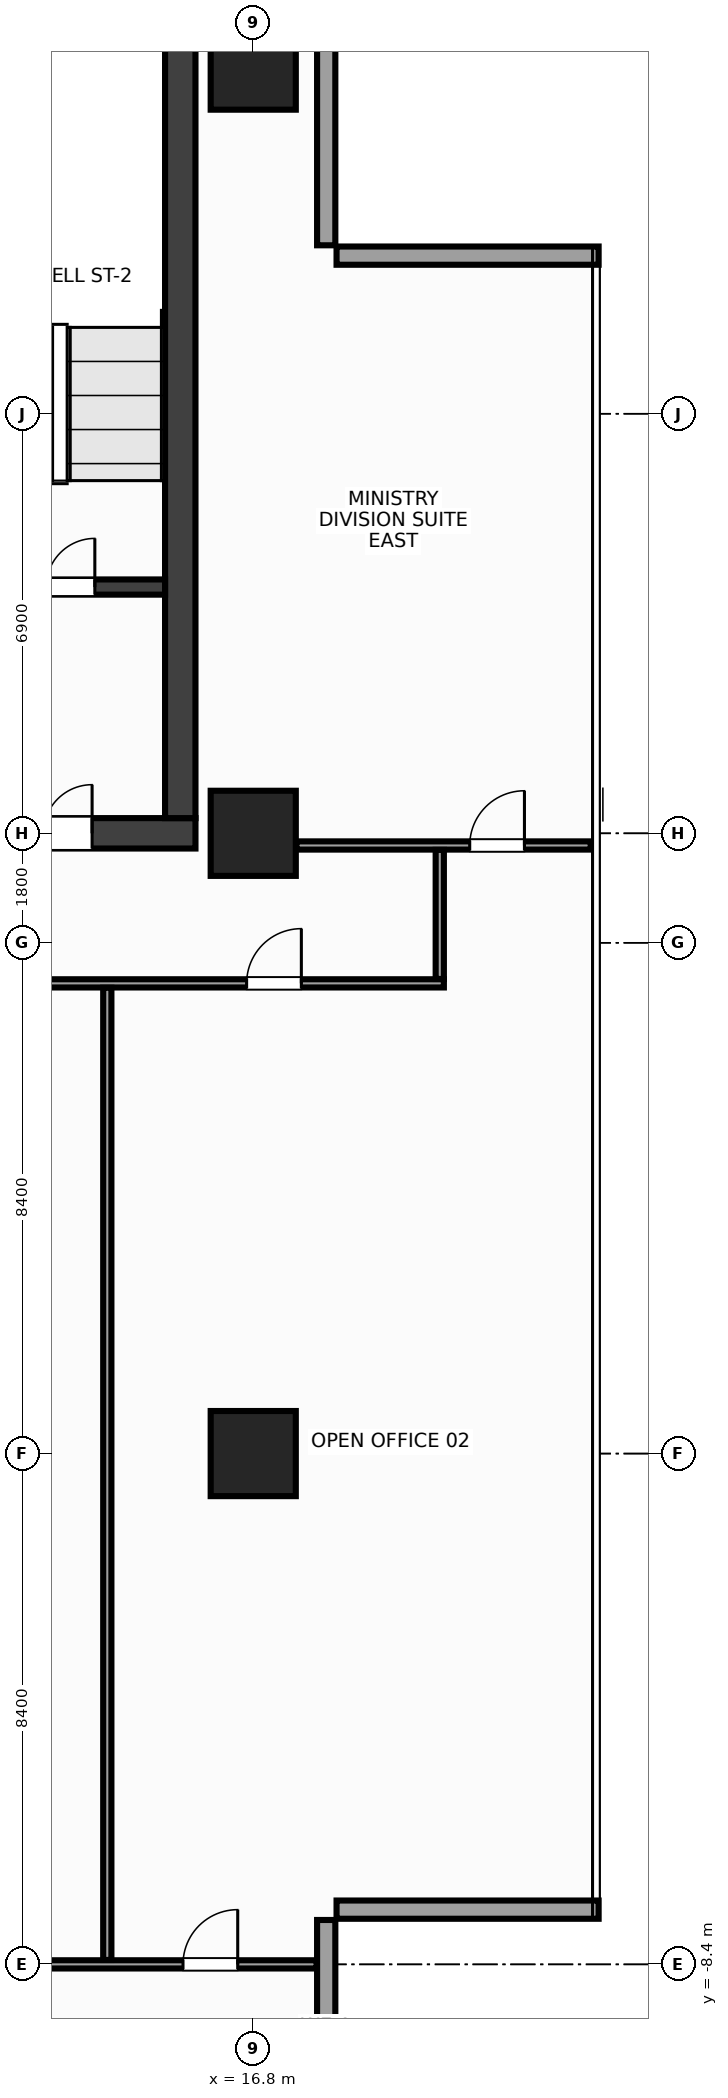
"""IFC4 building model, lengths in metres.
Left out: names, types, materials, properties, quantities, classifications, styles, units other than length and angle.
Written with IfcOpenShell. Run it as: python <this file> out.ifc"""

import sys

from ifc_helpers import new_model, si_unit, direction, frame, frame_2d, origin, origin_2d, place, context, subcontext, project, spatial, rectangle, extrude, source, transform, mapped, element, fill, save


model = new_model("IFC4")
c1 = context("Model", 3, precision=1e-05, world=origin(), true_north=direction((0.0, 1.0)))
c2 = subcontext(c1, "Body", "Model", "MODEL_VIEW")
j1 = project(units=[si_unit("LENGTHUNIT", "METRE"), si_unit("PLANEANGLEUNIT", "RADIAN")], contexts=[c1])
p1 = place(None, origin())
s1 = spatial("IfcSite", under=j1, at=p1, CompositionType="ELEMENT")
p2 = place(p1, origin())
s2 = spatial("IfcBuilding", under=s1, at=p2, CompositionType="ELEMENT")
p3 = place(p2, frame((0.0, 0.0, 239.6)))
s3 = spatial("IfcBuildingStorey", under=s2, at=p3, CompositionType="ELEMENT", Elevation=239.6)
m1 = source(origin(), c2, "Body", "SweptSolid", [
    extrude(rectangle(XDim=31.7, YDim=0.5, at=frame_2d((15.85, 0.0))), origin(), (0.0, 0.0, 1.0), 3.6),
])
p4 = place(p3, frame((-15.85, 10.2, 0.0), z_axis=(0.0, 0.0, 1.0), x_axis=(1.0, 0.0, 0.0)))
e1 = element("IfcWall", 1, at=p4, inside=s3, PredefinedType="SHEAR", context=c2, shape_type="MappedRepresentation", body=[
    mapped(m1, transform((0.0, 0.0, 0.0), x_axis=(1.0, 0.0, 0.0), y_axis=(0.0, 1.0, 0.0), z_axis=(0.0, 0.0, 1.0), scale=1.0)),
])
p5 = place(p4, frame((1.7, 0.0, 0.0)))
e2 = element("IfcOpeningElement", 2, at=p5, cuts=e1, PredefinedType="OPENING", context=c2, shape_type="SweptSolid", body=[
    extrude(rectangle(XDim=1.6, YDim=2.15, at=frame_2d((0.8, 1.075))), frame((0.0, 0.262, 0.0), z_axis=(0.0, -1.0, 0.0), x_axis=(1.0, 0.0, 0.0)), (0.0, 0.0, 1.0), 0.524),
])
p6 = place(p4, frame((28.4, 0.0, 0.0)))
e3 = element("IfcOpeningElement", 3, at=p6, cuts=e1, PredefinedType="OPENING", context=c2, shape_type="SweptSolid", body=[
    extrude(rectangle(XDim=1.6, YDim=2.15, at=frame_2d((0.8, 1.075))), frame((0.0, 0.262, 0.0), z_axis=(0.0, -1.0, 0.0), x_axis=(1.0, 0.0, 0.0)), (0.0, 0.0, 1.0), 0.524),
])
p7 = place(p4, frame((15.1, 0.0, 0.0)))
e4 = element("IfcOpeningElement", 4, at=p7, cuts=e1, PredefinedType="OPENING", context=c2, shape_type="SweptSolid", body=[
    extrude(rectangle(XDim=1.5, YDim=2.2, at=frame_2d((0.75, 1.1))), frame((0.0, 0.262, 0.0), z_axis=(0.0, -1.0, 0.0), x_axis=(1.0, 0.0, 0.0)), (0.0, 0.0, 1.0), 0.524),
])
m2 = source(origin(), c2, "Body", "SweptSolid", [
    extrude(rectangle(XDim=13.1, YDim=0.5, at=frame_2d((6.55, 0.0))), origin(), (0.0, 0.0, 1.0), 3.6),
])
p8 = place(p3, frame((15.6, 10.45, 0.0), z_axis=(0.0, 0.0, 1.0), x_axis=(0.0, 1.0, 0.0)))
e5 = element("IfcWall", 5, at=p8, inside=s3, PredefinedType="SHEAR", context=c2, shape_type="MappedRepresentation", body=[
    mapped(m2, transform((0.0, 0.0, 0.0), x_axis=(1.0, 0.0, 0.0), y_axis=(0.0, 1.0, 0.0), z_axis=(0.0, 0.0, 1.0), scale=1.0)),
])
m3 = source(origin(), c2, "Body", "SweptSolid", [
    extrude(rectangle(XDim=3.705, YDim=0.25, at=frame_2d((1.853, 0.0))), origin(), (0.0, 0.0, 1.0), 3.6),
])
p9 = place(p3, frame((11.645, 14.25, 0.0), z_axis=(0.0, 0.0, 1.0), x_axis=(1.0, 0.0, 0.0)))
e6 = element("IfcWall", 6, at=p9, inside=s3, PredefinedType="SHEAR", context=c2, shape_type="MappedRepresentation", body=[
    mapped(m3, transform((0.0, 0.0, 0.0), x_axis=(1.0, 0.0, 0.0), y_axis=(0.0, 1.0, 0.0), z_axis=(0.0, 0.0, 1.0), scale=1.0)),
])
p10 = place(p9, frame((0.95, 0.0, 0.0)))
e7 = element("IfcOpeningElement", 7, at=p10, cuts=e6, PredefinedType="OPENING", context=c2, shape_type="SweptSolid", body=[
    extrude(rectangle(XDim=1.6, YDim=2.15, at=frame_2d((0.8, 1.075))), frame((0.0, 0.137, 0.0), z_axis=(0.0, -1.0, 0.0), x_axis=(1.0, 0.0, 0.0)), (0.0, 0.0, 1.0), 0.274),
])
m4 = source(origin(), c2, "Body", "SweptSolid", [
    extrude(rectangle(XDim=1.4, YDim=1.4, at=origin_2d()), origin(), (0.0, 0.0, 1.0), 3.6),
])
for number, where, z_axis, x_axis in (
    (8, (16.8, 0.0, 0.0), (0.0, 0.0, 1.0), (1.0, 0.0, 0.0)),
    (9, (16.8, 10.2, 0.0), (0.0, 0.0, 1.0), (1.0, 0.0, 0.0)),
    (10, (16.8, 22.8, 0.0), (0.0, 0.0, 1.0), (1.0, 0.0, 0.0)),
):
    element("IfcColumn", number, at=place(p3, frame(where, z_axis=z_axis, x_axis=x_axis)), inside=s3, PredefinedType="COLUMN", context=c2, shape_type="MappedRepresentation", body=[
        mapped(m4, transform((0.0, 0.0, 0.0), x_axis=(1.0, 0.0, 0.0), y_axis=(0.0, 1.0, 0.0), z_axis=(0.0, 0.0, 1.0), scale=1.0)),
    ])
m5 = source(origin(), c2, "Body", "SweptSolid", [
    extrude(rectangle(XDim=4.31, YDim=0.3, at=frame_2d((2.155, 0.0))), origin(), (0.0, 0.0, 1.0), 2.75),
])
for number, where, z_axis, x_axis in (
    (11, (18.0, -11.98, 0.0), (0.0, 0.0, 1.0), (0.0, 1.0, 0.0)),
    (12, (18.17, -7.5, 0.0), (0.0, 0.0, 1.0), (1.0, 0.0, 0.0)),
    (13, (22.48, 19.7, 0.0), (0.0, 0.0, 1.0), (-1.0, 0.0, 0.0)),
):
    element("IfcWall", number, at=place(p3, frame(where, z_axis=z_axis, x_axis=x_axis)), inside=s3, PredefinedType="STANDARD", context=c2, shape_type="MappedRepresentation", body=[
        mapped(m5, transform((0.0, 0.0, 0.0), x_axis=(1.0, 0.0, 0.0), y_axis=(0.0, 1.0, 0.0), z_axis=(0.0, 0.0, 1.0), scale=1.0)),
    ])
m6 = source(origin(), c2, "Body", "SweptSolid", [
    extrude(rectangle(XDim=4.31, YDim=0.3, at=frame_2d((2.155, 0.0))), origin(), (0.0, 0.0, 1.0), 2.75),
])
p11 = place(p3, frame((18.0, 19.87, 0.0), z_axis=(0.0, 0.0, 1.0), x_axis=(0.0, 1.0, 0.0)))
e14 = element("IfcWall", 14, at=p11, inside=s3, PredefinedType="STANDARD", context=c2, shape_type="MappedRepresentation", body=[
    mapped(m6, transform((0.0, 0.0, 0.0), x_axis=(1.0, 0.0, 0.0), y_axis=(0.0, 1.0, 0.0), z_axis=(0.0, 0.0, 1.0), scale=1.0)),
])
m7 = source(origin(), c2, "Body", "SweptSolid", [
    extrude(rectangle(XDim=4.84, YDim=0.135, at=frame_2d((2.42, 0.0))), origin(), (0.0, 0.0, 1.0), 3.37),
])
p12 = place(p3, frame((17.51, 10.0, 0.0), z_axis=(0.0, 0.0, 1.0), x_axis=(1.0, 0.0, 0.0)))
e15 = element("IfcWall", 15, at=p12, inside=s3, PredefinedType="PARTITIONING", context=c2, shape_type="MappedRepresentation", body=[
    mapped(m7, transform((0.0, 0.0, 0.0), x_axis=(1.0, 0.0, 0.0), y_axis=(0.0, 1.0, 0.0), z_axis=(0.0, 0.0, 1.0), scale=1.0)),
])
p13 = place(p12, frame((2.85, 0.0, 0.0)))
e16 = element("IfcOpeningElement", 16, at=p13, cuts=e15, PredefinedType="OPENING", context=c2, shape_type="SweptSolid", body=[
    extrude(rectangle(XDim=0.9, YDim=2.15, at=frame_2d((0.45, 1.075))), frame((0.0, 0.08, 0.0), z_axis=(0.0, -1.0, 0.0), x_axis=(1.0, 0.0, 0.0)), (0.0, 0.0, 1.0), 0.159),
])
m8 = source(origin(), c2, "Body", "SweptSolid", [
    extrude(rectangle(XDim=21.9, YDim=0.135, at=frame_2d((10.95, 0.0))), origin(), (0.0, 0.0, 1.0), 2.755),
])
p14 = place(p3, frame((-1.965, 7.732, 0.0), z_axis=(0.0, 0.0, 1.0), x_axis=(1.0, 0.0, 0.0)))
e17 = element("IfcWall", 17, at=p14, inside=s3, PredefinedType="PARTITIONING", context=c2, shape_type="MappedRepresentation", body=[
    mapped(m8, transform((0.0, 0.0, 0.0), x_axis=(1.0, 0.0, 0.0), y_axis=(0.0, 1.0, 0.0), z_axis=(0.0, 0.0, 1.0), scale=1.0)),
])
p15 = place(p14, frame((18.656, 0.0, 0.0)))
e18 = element("IfcOpeningElement", 18, at=p15, cuts=e17, PredefinedType="OPENING", context=c2, shape_type="SweptSolid", body=[
    extrude(rectangle(XDim=0.9, YDim=2.15, at=frame_2d((0.45, 1.075))), frame((0.0, 0.08, 0.0), z_axis=(0.0, -1.0, 0.0), x_axis=(1.0, 0.0, 0.0)), (0.0, 0.0, 1.0), 0.159),
])
p16 = place(p14, frame((8.115, 0.0, 0.0)))
e19 = element("IfcOpeningElement", 19, at=p16, cuts=e17, PredefinedType="OPENING", context=c2, shape_type="SweptSolid", body=[
    extrude(rectangle(XDim=0.9, YDim=2.15, at=frame_2d((0.45, 1.075))), frame((0.0, 0.08, 0.0), z_axis=(0.0, -1.0, 0.0), x_axis=(1.0, 0.0, 0.0)), (0.0, 0.0, 1.0), 0.159),
])
m9 = source(origin(), c2, "Body", "SweptSolid", [
    extrude(rectangle(XDim=2.123, YDim=0.135, at=frame_2d((1.061, 0.0))), origin(), (0.0, 0.0, 1.0), 3.37),
])
p17 = place(p3, frame((19.867, 7.805, 0.0), z_axis=(0.0, 0.0, 1.0), x_axis=(0.0, 1.0, 0.0)))
e20 = element("IfcWall", 20, at=p17, inside=s3, PredefinedType="PARTITIONING", context=c2, shape_type="MappedRepresentation", body=[
    mapped(m9, transform((0.0, 0.0, 0.0), x_axis=(1.0, 0.0, 0.0), y_axis=(0.0, 1.0, 0.0), z_axis=(0.0, 0.0, 1.0), scale=1.0)),
])
m10 = source(origin(), c2, "Body", "SweptSolid", [
    extrude(rectangle(XDim=35.684, YDim=0.135, at=frame_2d((17.842, 0.0))), origin(), (0.0, 0.0, 1.0), 2.755),
])
p18 = place(p3, frame((-17.842, -8.4, 0.0), z_axis=(0.0, 0.0, 1.0), x_axis=(1.0, 0.0, 0.0)))
e21 = element("IfcWall", 21, at=p18, inside=s3, PredefinedType="PARTITIONING", context=c2, shape_type="MappedRepresentation", body=[
    mapped(m10, transform((0.0, 0.0, 0.0), x_axis=(1.0, 0.0, 0.0), y_axis=(0.0, 1.0, 0.0), z_axis=(0.0, 0.0, 1.0), scale=1.0)),
])
p19 = place(p18, frame((8.892, 0.0, 0.0)))
e22 = element("IfcOpeningElement", 22, at=p19, cuts=e21, PredefinedType="OPENING", context=c2, shape_type="SweptSolid", body=[
    extrude(rectangle(XDim=0.9, YDim=2.15, at=frame_2d((0.45, 1.075))), frame((0.0, 0.08, 0.0), z_axis=(0.0, -1.0, 0.0), x_axis=(1.0, 0.0, 0.0)), (0.0, 0.0, 1.0), 0.159),
])
p20 = place(p18, frame((33.487, 0.0, 0.0)))
e23 = element("IfcOpeningElement", 23, at=p20, cuts=e21, PredefinedType="OPENING", context=c2, shape_type="SweptSolid", body=[
    extrude(rectangle(XDim=0.9, YDim=2.15, at=frame_2d((0.45, 1.075))), frame((0.0, 0.08, 0.0), z_axis=(0.0, -1.0, 0.0), x_axis=(1.0, 0.0, 0.0)), (0.0, 0.0, 1.0), 0.159),
])
p21 = place(p18, frame((4.092, 0.0, 0.0)))
e24 = element("IfcOpeningElement", 24, at=p21, cuts=e21, PredefinedType="OPENING", context=c2, shape_type="SweptSolid", body=[
    extrude(rectangle(XDim=0.9, YDim=2.15, at=frame_2d((0.45, 1.075))), frame((0.0, 0.08, 0.0), z_axis=(0.0, -1.0, 0.0), x_axis=(1.0, 0.0, 0.0)), (0.0, 0.0, 1.0), 0.159),
])
p22 = place(p18, frame((18.692, 0.0, 0.0)))
e25 = element("IfcOpeningElement", 25, at=p22, cuts=e21, PredefinedType="OPENING", context=c2, shape_type="SweptSolid", body=[
    extrude(rectangle(XDim=0.9, YDim=2.15, at=frame_2d((0.45, 1.075))), frame((0.0, 0.08, 0.0), z_axis=(0.0, -1.0, 0.0), x_axis=(1.0, 0.0, 0.0)), (0.0, 0.0, 1.0), 0.159),
])
p23 = place(p18, frame((25.292, 0.0, 0.0)))
e26 = element("IfcOpeningElement", 26, at=p23, cuts=e21, PredefinedType="OPENING", context=c2, shape_type="SweptSolid", body=[
    extrude(rectangle(XDim=0.9, YDim=2.15, at=frame_2d((0.45, 1.075))), frame((0.0, 0.08, 0.0), z_axis=(0.0, -1.0, 0.0), x_axis=(1.0, 0.0, 0.0)), (0.0, 0.0, 1.0), 0.159),
])
m11 = source(origin(), c2, "Body", "SweptSolid", [
    extrude(rectangle(XDim=15.987, YDim=0.135, at=frame_2d((7.994, 0.0))), origin(), (0.0, 0.0, 1.0), 2.655),
])
p24 = place(p3, frame((14.4, -8.327, 0.0), z_axis=(0.0, 0.0, 1.0), x_axis=(0.0, 1.0, 0.0)))
e27 = element("IfcWall", 27, at=p24, inside=s3, PredefinedType="PARTITIONING", context=c2, shape_type="MappedRepresentation", body=[
    mapped(m11, transform((0.0, 0.0, 0.0), x_axis=(1.0, 0.0, 0.0), y_axis=(0.0, 1.0, 0.0), z_axis=(0.0, 0.0, 1.0), scale=1.0)),
])
m12 = source(origin(), c2, "Body", "SweptSolid", [
    extrude(rectangle(XDim=1.6, YDim=2.15, at=frame_2d((0.8, 1.075))), frame((0.0, 0.025, 0.0), z_axis=(0.0, -1.0, 0.0), x_axis=(1.0, 0.0, 0.0)), (0.0, 0.0, 1.0), 0.05),
])
p25 = place(p10, origin())
e28 = element("IfcDoor", 28, at=p25, inside=s3, OperationType="DOUBLE_DOOR_SINGLE_SWING", PredefinedType="DOOR", context=c2, shape_type="MappedRepresentation", body=[
    mapped(m12, transform((0.0, 0.0, 0.0), x_axis=(1.0, 0.0, 0.0), y_axis=(0.0, 1.0, 0.0), z_axis=(0.0, 0.0, 1.0), scale=1.0)),
])
fill(e7, e28)
p26 = place(p6, origin())
e29 = element("IfcDoor", 29, at=p26, inside=s3, OperationType="DOUBLE_DOOR_SINGLE_SWING", PredefinedType="DOOR", context=c2, shape_type="MappedRepresentation", body=[
    mapped(m12, transform((0.0, 0.0, 0.0), x_axis=(1.0, 0.0, 0.0), y_axis=(0.0, 1.0, 0.0), z_axis=(0.0, 0.0, 1.0), scale=1.0)),
])
fill(e3, e29)
m13 = source(origin(), c2, "Body", "SweptSolid", [
    extrude(rectangle(XDim=0.9, YDim=2.15, at=frame_2d((0.45, 1.075))), frame((0.0, 0.025, 0.0), z_axis=(0.0, -1.0, 0.0), x_axis=(1.0, 0.0, 0.0)), (0.0, 0.0, 1.0), 0.05),
])
p27 = place(p15, origin())
e30 = element("IfcDoor", 30, at=p27, inside=s3, OperationType="SINGLE_SWING_RIGHT", PredefinedType="DOOR", context=c2, shape_type="MappedRepresentation", body=[
    mapped(m13, transform((0.0, 0.0, 0.0), x_axis=(1.0, 0.0, 0.0), y_axis=(0.0, 1.0, 0.0), z_axis=(0.0, 0.0, 1.0), scale=1.0)),
])
fill(e18, e30)
p28 = place(p13, origin())
e31 = element("IfcDoor", 31, at=p28, inside=s3, OperationType="SINGLE_SWING_RIGHT", PredefinedType="DOOR", context=c2, shape_type="MappedRepresentation", body=[
    mapped(m13, transform((0.0, 0.0, 0.0), x_axis=(1.0, 0.0, 0.0), y_axis=(0.0, 1.0, 0.0), z_axis=(0.0, 0.0, 1.0), scale=1.0)),
])
fill(e16, e31)
p29 = place(p20, origin())
e32 = element("IfcDoor", 32, at=p29, inside=s3, OperationType="SINGLE_SWING_RIGHT", PredefinedType="DOOR", context=c2, shape_type="MappedRepresentation", body=[
    mapped(m13, transform((0.0, 0.0, 0.0), x_axis=(1.0, 0.0, 0.0), y_axis=(0.0, 1.0, 0.0), z_axis=(0.0, 0.0, 1.0), scale=1.0)),
])
fill(e23, e32)
save(model, sys.argv[1])
